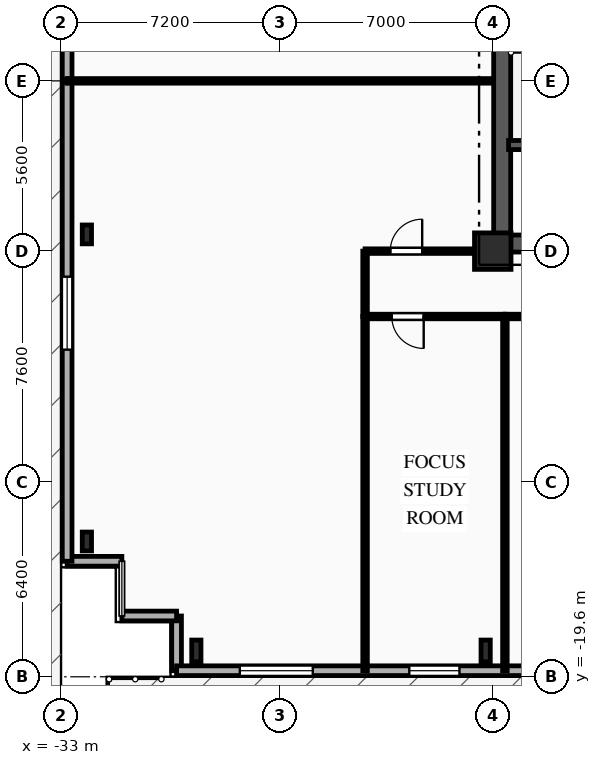
"""IFC4 building model, lengths in metres.
Left out: names, types, materials, properties, quantities, classifications, styles, units other than length and angle.
Written with IfcOpenShell. Run it as: python <this file> out.ifc"""

import sys

from ifc_helpers import new_model, si_unit, direction, frame, frame_2d, origin, origin_2d, place, context, subcontext, project, spatial, rectangle, i_section, extrude, element, fill, save


model = new_model("IFC4")
c1 = context("Model", 3, precision=1e-05, world=origin(), true_north=direction((0.0, 1.0)))
c2 = subcontext(c1, "Body", "Model", "MODEL_VIEW")
j1 = project(units=[si_unit("LENGTHUNIT", "METRE"), si_unit("PLANEANGLEUNIT", "RADIAN")], contexts=[c1])
p1 = place(None, origin())
s1 = spatial("IfcSite", under=j1, at=p1, CompositionType="ELEMENT")
p2 = place(p1, origin())
s2 = spatial("IfcBuilding", under=s1, at=p2, CompositionType="ELEMENT")
p3 = place(p2, frame((0.0, 0.0, 27.0)))
s3 = spatial("IfcBuildingStorey", under=s2, at=p3, CompositionType="ELEMENT", Elevation=27.0)
p4 = place(p3, frame((-18.8, -5.6, 0.0), z_axis=(0.0, 0.0, 1.0), x_axis=(1.0, 0.0, 0.0)))
e1 = element("IfcColumn", 1, at=p4, inside=s3, PredefinedType="COLUMN", context=c2, shape_type="SweptSolid", body=[
    extrude(rectangle(XDim=1.2, YDim=1.2, at=origin_2d()), origin(), (0.0, 0.0, 1.0), 3.35),
])
for number, where, z_axis, x_axis in (
    (2, (-28.55, -18.75, 0.0), (0.0, 0.0, 1.0), (1.0, 0.0, 0.0)),
    (3, (-19.033, -18.75, 0.0), (0.0, 0.0, 1.0), (1.0, 0.0, 0.0)),
):
    element("IfcColumn", number, at=place(p3, frame(where, z_axis=z_axis, x_axis=x_axis)), inside=s3, PredefinedType="COLUMN", context=c2, shape_type="SweptSolid", body=[
        extrude(i_section(OverallWidth=0.304, OverallDepth=0.716, WebThickness=0.021, FlangeThickness=0.04, FilletRadius=0.027, at=origin_2d()), origin(), (0.0, 0.0, 1.0), 3.35),
    ])
for number, where, z_axis, x_axis in (
    (4, (-32.15, -5.05, 0.0), (0.0, 0.0, 1.0), (1.0, 0.0, 0.0)),
    (5, (-32.15, -15.15, 0.0), (0.0, 0.0, 1.0), (1.0, 0.0, 0.0)),
):
    element("IfcColumn", number, at=place(p3, frame(where, z_axis=z_axis, x_axis=x_axis)), inside=s3, PredefinedType="COLUMN", context=c2, shape_type="SweptSolid", body=[
        extrude(i_section(OverallWidth=0.305, OverallDepth=0.62, WebThickness=0.021, FlangeThickness=0.04, FilletRadius=0.027, at=origin_2d()), origin(), (0.0, 0.0, 1.0), 3.35),
    ])
p5 = place(p3, frame((-29.2, -19.4, 0.0), z_axis=(0.0, 0.0, 1.0), x_axis=(0.0, 1.0, 0.0)))
e6 = element("IfcWall", 6, at=p5, inside=s3, PredefinedType="SOLIDWALL", context=c2, shape_type="SweptSolid", body=[
    extrude(rectangle(XDim=1.8, YDim=0.32, at=frame_2d((0.9, 0.0))), origin(), (0.0, 0.0, 1.0), 3.035),
])
for number, where, z_axis, x_axis in (
    (7, (-29.2, -17.6, 0.0), (0.0, 0.0, 1.0), (-1.0, 0.0, 0.0)),
    (8, (-31.0, -15.8, 0.0), (0.0, 0.0, 1.0), (-1.0, 0.0, 0.0)),
):
    element("IfcWall", number, at=place(p3, frame(where, z_axis=z_axis, x_axis=x_axis)), inside=s3, PredefinedType="SOLIDWALL", context=c2, shape_type="SweptSolid", body=[
        extrude(rectangle(XDim=1.8, YDim=0.32, at=frame_2d((0.9, 0.0))), origin(), (0.0, 0.0, 1.0), 3.035),
    ])
p6 = place(p3, frame((-32.8, -15.8, 0.0), z_axis=(0.0, 0.0, 1.0), x_axis=(0.0, 1.0, 0.0)))
e9 = element("IfcWall", 9, at=p6, inside=s3, PredefinedType="SOLIDWALL", context=c2, shape_type="SweptSolid", body=[
    extrude(rectangle(XDim=31.6, YDim=0.32, at=frame_2d((15.8, 0.0))), origin(), (0.0, 0.0, 1.0), 3.035),
])
p7 = place(p6, frame((6.96, 0.0, 0.85)))
e10 = element("IfcOpeningElement", 10, at=p7, cuts=e9, PredefinedType="OPENING", context=c2, shape_type="SweptSolid", body=[
    extrude(rectangle(XDim=2.4, YDim=1.95, at=frame_2d((1.2, 0.975))), frame((0.0, 0.17, 0.0), z_axis=(0.0, -1.0, 0.0), x_axis=(1.0, 0.0, 0.0)), (0.0, 0.0, 1.0), 0.34),
])
p8 = place(p6, frame((22.32, 0.0, 0.85)))
e11 = element("IfcOpeningElement", 11, at=p8, cuts=e9, PredefinedType="OPENING", context=c2, shape_type="SweptSolid", body=[
    extrude(rectangle(XDim=2.4, YDim=1.95, at=frame_2d((1.2, 0.975))), frame((0.0, 0.17, 0.0), z_axis=(0.0, -1.0, 0.0), x_axis=(1.0, 0.0, 0.0)), (0.0, 0.0, 1.0), 0.34),
])
p9 = place(p3, frame((29.2, -19.4, 0.0), z_axis=(0.0, 0.0, 1.0), x_axis=(-1.0, 0.0, 0.0)))
e12 = element("IfcWall", 12, at=p9, inside=s3, PredefinedType="SOLIDWALL", context=c2, shape_type="SweptSolid", body=[
    extrude(rectangle(XDim=58.4, YDim=0.32, at=frame_2d((29.2, 0.0))), origin(), (0.0, 0.0, 1.0), 3.035),
])
p10 = place(p9, frame((6.0, 0.0, 0.0)))
e13 = element("IfcOpeningElement", 13, at=p10, cuts=e12, PredefinedType="OPENING", context=c2, shape_type="SweptSolid", body=[
    extrude(rectangle(XDim=1.5, YDim=2.2, at=frame_2d((0.75, 1.1))), frame((0.0, 0.17, 0.0), z_axis=(0.0, -1.0, 0.0), x_axis=(1.0, 0.0, 0.0)), (0.0, 0.0, 1.0), 0.34),
])
p11 = place(p9, frame((8.198, 0.0, 0.85)))
e14 = element("IfcOpeningElement", 14, at=p11, cuts=e12, PredefinedType="OPENING", context=c2, shape_type="SweptSolid", body=[
    extrude(rectangle(XDim=1.65, YDim=1.85, at=frame_2d((0.825, 0.925))), frame((0.0, 0.17, 0.0), z_axis=(0.0, -1.0, 0.0), x_axis=(1.0, 0.0, 0.0)), (0.0, 0.0, 1.0), 0.34),
])
p12 = place(p9, frame((12.335, 0.0, 0.85)))
e15 = element("IfcOpeningElement", 15, at=p12, cuts=e12, PredefinedType="OPENING", context=c2, shape_type="SweptSolid", body=[
    extrude(rectangle(XDim=1.65, YDim=1.85, at=frame_2d((0.825, 0.925))), frame((0.0, 0.17, 0.0), z_axis=(0.0, -1.0, 0.0), x_axis=(1.0, 0.0, 0.0)), (0.0, 0.0, 1.0), 0.34),
])
p13 = place(p9, frame((19.924, 0.0, 0.85)))
e16 = element("IfcOpeningElement", 16, at=p13, cuts=e12, PredefinedType="OPENING", context=c2, shape_type="SweptSolid", body=[
    extrude(rectangle(XDim=2.2, YDim=1.85, at=frame_2d((1.1, 0.925))), frame((0.0, 0.17, 0.0), z_axis=(0.0, -1.0, 0.0), x_axis=(1.0, 0.0, 0.0)), (0.0, 0.0, 1.0), 0.34),
])
p14 = place(p9, frame((26.565, 0.0, 0.85)))
e17 = element("IfcOpeningElement", 17, at=p14, cuts=e12, PredefinedType="OPENING", context=c2, shape_type="SweptSolid", body=[
    extrude(rectangle(XDim=2.4, YDim=1.95, at=frame_2d((1.2, 0.975))), frame((0.0, 0.17, 0.0), z_axis=(0.0, -1.0, 0.0), x_axis=(1.0, 0.0, 0.0)), (0.0, 0.0, 1.0), 0.34),
])
p15 = place(p9, frame((35.765, 0.0, 0.85)))
e18 = element("IfcOpeningElement", 18, at=p15, cuts=e12, PredefinedType="OPENING", context=c2, shape_type="SweptSolid", body=[
    extrude(rectangle(XDim=2.4, YDim=1.95, at=frame_2d((1.2, 0.975))), frame((0.0, 0.17, 0.0), z_axis=(0.0, -1.0, 0.0), x_axis=(1.0, 0.0, 0.0)), (0.0, 0.0, 1.0), 0.34),
])
p16 = place(p9, frame((44.495, 0.0, 0.85)))
e19 = element("IfcOpeningElement", 19, at=p16, cuts=e12, PredefinedType="OPENING", context=c2, shape_type="SweptSolid", body=[
    extrude(rectangle(XDim=1.65, YDim=1.85, at=frame_2d((0.825, 0.925))), frame((0.0, 0.17, 0.0), z_axis=(0.0, -1.0, 0.0), x_axis=(1.0, 0.0, 0.0)), (0.0, 0.0, 1.0), 0.34),
])
p17 = place(p9, frame((49.095, 0.0, 0.85)))
e20 = element("IfcOpeningElement", 20, at=p17, cuts=e12, PredefinedType="OPENING", context=c2, shape_type="SweptSolid", body=[
    extrude(rectangle(XDim=1.65, YDim=1.85, at=frame_2d((0.825, 0.925))), frame((0.0, 0.17, 0.0), z_axis=(0.0, -1.0, 0.0), x_axis=(1.0, 0.0, 0.0)), (0.0, 0.0, 1.0), 0.34),
])
p18 = place(p9, frame((53.92, 0.0, 0.85)))
e21 = element("IfcOpeningElement", 21, at=p18, cuts=e12, PredefinedType="OPENING", context=c2, shape_type="SweptSolid", body=[
    extrude(rectangle(XDim=2.4, YDim=1.95, at=frame_2d((1.2, 0.975))), frame((0.0, 0.17, 0.0), z_axis=(0.0, -1.0, 0.0), x_axis=(1.0, 0.0, 0.0)), (0.0, 0.0, 1.0), 0.34),
])
p19 = place(p3, frame((-18.8, -5.35, 0.0), z_axis=(0.0, 0.0, 1.0), x_axis=(1.0, 0.0, 0.0)))
e22 = element("IfcWall", 22, at=p19, inside=s3, PredefinedType="SHEAR", context=c2, shape_type="SweptSolid", body=[
    extrude(rectangle(XDim=9.6, YDim=0.56, at=frame_2d((4.8, 0.0))), origin(), (0.0, 0.0, 1.0), 3.035),
])
p20 = place(p19, frame((1.05, 0.0, 0.0)))
e23 = element("IfcOpeningElement", 23, at=p20, cuts=e22, PredefinedType="OPENING", context=c2, shape_type="SweptSolid", body=[
    extrude(rectangle(XDim=0.9, YDim=2.1, at=frame_2d((0.45, 1.05))), frame((0.0, 0.29, 0.0), z_axis=(0.0, -1.0, 0.0), x_axis=(1.0, 0.0, 0.0)), (0.0, 0.0, 1.0), 0.58),
])
p21 = place(p3, frame((-18.49, -5.05, 0.0), z_axis=(0.0, 0.0, 1.0), x_axis=(0.0, 1.0, 0.0)))
e24 = element("IfcWall", 24, at=p21, inside=s3, PredefinedType="SHEAR", context=c2, shape_type="SweptSolid", body=[
    extrude(rectangle(XDim=10.1, YDim=0.56, at=frame_2d((5.05, 0.0))), origin(), (0.0, 0.0, 1.0), 3.035),
])
p22 = place(p3, frame((-18.28, -2.11, 0.0), z_axis=(0.0, 0.0, 1.0), x_axis=(1.0, 0.0, 0.0)))
e25 = element("IfcWall", 25, at=p22, inside=s3, PredefinedType="SHEAR", context=c2, shape_type="SweptSolid", body=[
    extrude(rectangle(XDim=3.18, YDim=0.3, at=frame_2d((1.59, 0.0))), origin(), (0.0, 0.0, 1.0), 3.035),
])
p23 = place(p3, frame((-23.0, -5.6, 0.0), z_axis=(0.0, 0.0, 1.0), x_axis=(1.0, 0.0, 0.0)))
e26 = element("IfcWall", 26, at=p23, inside=s3, PredefinedType="PARTITIONING", context=c2, shape_type="SweptSolid", body=[
    extrude(rectangle(XDim=4.2, YDim=0.15, at=frame_2d((2.1, 0.0))), origin(), (0.0, 0.0, 1.0), 3.035),
])
p24 = place(p23, frame((0.829, 0.0, 0.0)))
e27 = element("IfcOpeningElement", 27, at=p24, cuts=e26, PredefinedType="OPENING", context=c2, shape_type="SweptSolid", body=[
    extrude(rectangle(XDim=1.05, YDim=2.15, at=frame_2d((0.525, 1.075))), frame((0.0, 0.085, 0.0), z_axis=(0.0, -1.0, 0.0), x_axis=(1.0, 0.0, 0.0)), (0.0, 0.0, 1.0), 0.17),
])
p25 = place(p3, frame((-23.0, -7.75, 0.0), z_axis=(0.0, 0.0, 1.0), x_axis=(0.0, 1.0, 0.0)))
e28 = element("IfcWall", 28, at=p25, inside=s3, PredefinedType="PARTITIONING", context=c2, shape_type="SweptSolid", body=[
    extrude(rectangle(XDim=2.15, YDim=0.15, at=frame_2d((1.075, 0.0))), origin(), (0.0, 0.0, 1.0), 3.035),
])
p26 = place(p3, frame((-18.4, -7.75, 0.0), z_axis=(0.0, 0.0, 1.0), x_axis=(-1.0, 0.0, 0.0)))
e29 = element("IfcWall", 29, at=p26, inside=s3, PredefinedType="PARTITIONING", context=c2, shape_type="SweptSolid", body=[
    extrude(rectangle(XDim=4.6, YDim=0.15, at=frame_2d((2.3, 0.0))), origin(), (0.0, 0.0, 1.0), 3.035),
])
p27 = place(p26, frame((2.671, 0.0, 0.0)))
e30 = element("IfcOpeningElement", 30, at=p27, cuts=e29, PredefinedType="OPENING", context=c2, shape_type="SweptSolid", body=[
    extrude(rectangle(XDim=1.05, YDim=2.15, at=frame_2d((0.525, 1.075))), frame((0.0, 0.085, 0.0), z_axis=(0.0, -1.0, 0.0), x_axis=(1.0, 0.0, 0.0)), (0.0, 0.0, 1.0), 0.17),
])
p28 = place(p3, frame((-13.8, -7.75, 0.0), z_axis=(0.0, 0.0, 1.0), x_axis=(-1.0, 0.0, 0.0)))
e31 = element("IfcWall", 31, at=p28, inside=s3, PredefinedType="PARTITIONING", context=c2, shape_type="SweptSolid", body=[
    extrude(rectangle(XDim=4.6, YDim=0.15, at=frame_2d((2.3, 0.0))), origin(), (0.0, 0.0, 1.0), 3.035),
])
p29 = place(p28, frame((0.879, 0.0, 0.0)))
e32 = element("IfcOpeningElement", 32, at=p29, cuts=e31, PredefinedType="OPENING", context=c2, shape_type="SweptSolid", body=[
    extrude(rectangle(XDim=1.05, YDim=2.15, at=frame_2d((0.525, 1.075))), frame((0.0, 0.085, 0.0), z_axis=(0.0, -1.0, 0.0), x_axis=(1.0, 0.0, 0.0)), (0.0, 0.0, 1.0), 0.17),
])
p30 = place(p3, frame((-32.8, 0.0, 0.0), z_axis=(0.0, 0.0, 1.0), x_axis=(1.0, 0.0, 0.0)))
e33 = element("IfcWall", 33, at=p30, inside=s3, PredefinedType="PARTITIONING", context=c2, shape_type="SweptSolid", body=[
    extrude(rectangle(XDim=14.0, YDim=0.15, at=frame_2d((7.0, 0.0))), origin(), (0.0, 0.0, 1.0), 3.035),
])
for number, where, z_axis, x_axis in (
    (34, (-23.0, -7.75, 0.0), (0.0, 0.0, 1.0), (0.0, -1.0, 0.0)),
    (35, (-18.4, -7.75, 0.0), (0.0, 0.0, 1.0), (0.0, -1.0, 0.0)),
):
    element("IfcWall", number, at=place(p3, frame(where, z_axis=z_axis, x_axis=x_axis)), inside=s3, PredefinedType="PARTITIONING", context=c2, shape_type="SweptSolid", body=[
        extrude(rectangle(XDim=11.65, YDim=0.15, at=frame_2d((5.825, 0.0))), origin(), (0.0, 0.0, 1.0), 3.035),
    ])
p31 = place(p7, origin())
e36 = element("IfcWindow", 36, at=p31, inside=s3, PartitioningType="SINGLE_PANEL", PredefinedType="WINDOW", context=c2, shape_type="SweptSolid", body=[
    extrude(rectangle(XDim=2.4, YDim=1.95, at=frame_2d((1.2, 0.975))), frame((0.0, 0.03, 0.0), z_axis=(0.0, -1.0, 0.0), x_axis=(1.0, 0.0, 0.0)), (0.0, 0.0, 1.0), 0.06),
])
fill(e10, e36)
p32 = place(p17, origin())
e37 = element("IfcWindow", 37, at=p32, inside=s3, PartitioningType="SINGLE_PANEL", PredefinedType="WINDOW", context=c2, shape_type="SweptSolid", body=[
    extrude(rectangle(XDim=1.65, YDim=1.85, at=frame_2d((0.825, 0.925))), frame((0.0, 0.03, 0.0), z_axis=(0.0, -1.0, 0.0), x_axis=(1.0, 0.0, 0.0)), (0.0, 0.0, 1.0), 0.06),
])
fill(e20, e37)
p33 = place(p18, origin())
e38 = element("IfcWindow", 38, at=p33, inside=s3, PartitioningType="SINGLE_PANEL", PredefinedType="WINDOW", context=c2, shape_type="SweptSolid", body=[
    extrude(rectangle(XDim=2.4, YDim=1.95, at=frame_2d((1.2, 0.975))), frame((0.0, 0.03, 0.0), z_axis=(0.0, -1.0, 0.0), x_axis=(1.0, 0.0, 0.0)), (0.0, 0.0, 1.0), 0.06),
])
fill(e21, e38)
p34 = place(p24, origin())
e39 = element("IfcDoor", 39, at=p34, inside=s3, OperationType="SINGLE_SWING_RIGHT", PredefinedType="DOOR", context=c2, shape_type="SweptSolid", body=[
    extrude(rectangle(XDim=1.05, YDim=2.15, at=frame_2d((0.525, 1.075))), frame((0.0, 0.025, 0.0), z_axis=(0.0, -1.0, 0.0), x_axis=(1.0, 0.0, 0.0)), (0.0, 0.0, 1.0), 0.05),
])
fill(e27, e39)
p35 = place(p27, origin())
e40 = element("IfcDoor", 40, at=p35, inside=s3, OperationType="SINGLE_SWING_LEFT", PredefinedType="DOOR", context=c2, shape_type="SweptSolid", body=[
    extrude(rectangle(XDim=1.05, YDim=2.15, at=frame_2d((0.525, 1.075))), frame((0.0, 0.025, 0.0), z_axis=(0.0, -1.0, 0.0), x_axis=(1.0, 0.0, 0.0)), (0.0, 0.0, 1.0), 0.05),
])
fill(e30, e40)
save(model, sys.argv[1])
